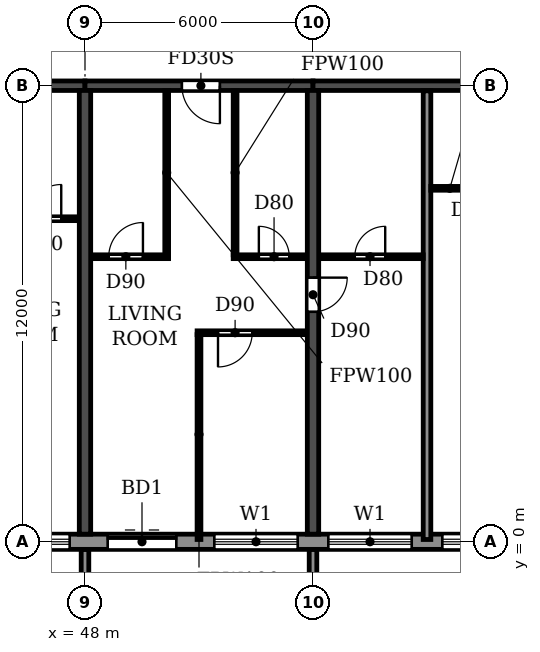
"""IFC4 building model, lengths in metres.
Left out: names, types, materials, properties, quantities, classifications, styles, units other than length and angle.
Written with IfcOpenShell. Run it as: python <this file> out.ifc"""

import sys

from ifc_helpers import new_model, si_unit, direction, frame, frame_2d, origin, place, context, subcontext, project, spatial, polyline, rectangle, outline, extrude, source, transform, mapped, element, fill, save


model = new_model("IFC4")
c1 = context("Model", 3, precision=1e-05, world=origin(), true_north=direction((0.0, 1.0)))
c2 = subcontext(c1, "Body", "Model", "MODEL_VIEW")
j1 = project(units=[si_unit("LENGTHUNIT", "METRE"), si_unit("PLANEANGLEUNIT", "RADIAN")], contexts=[c1])
p1 = place(None, origin())
s1 = spatial("IfcSite", under=j1, at=p1, CompositionType="ELEMENT")
p2 = place(p1, origin())
s2 = spatial("IfcBuilding", under=s1, at=p2, CompositionType="ELEMENT")
p3 = place(p2, frame((0.0, 0.0, 132.3)))
s3 = spatial("IfcBuildingStorey", under=s2, at=p3, CompositionType="ELEMENT", Elevation=132.3)
p4 = place(p3, frame((48.0, 0.2, 0.0), z_axis=(0.0, 0.0, 1.0), x_axis=(0.0, 1.0, 0.0)))
e1 = element("IfcWall", 1, at=p4, inside=s3, PredefinedType="SHEAR", context=c2, shape_type="SweptSolid", body=[
    extrude(rectangle(XDim=11.675, YDim=0.3, at=frame_2d((5.837, 0.0))), origin(), (0.0, 0.0, 1.0), 3.07),
])
p5 = place(p3, frame((54.0, 0.2, 0.0), z_axis=(0.0, 0.0, 1.0), x_axis=(0.0, 1.0, 0.0)))
e2 = element("IfcWall", 2, at=p5, inside=s3, PredefinedType="SHEAR", context=c2, shape_type="SweptSolid", body=[
    extrude(rectangle(XDim=11.675, YDim=0.3, at=frame_2d((5.837, 0.0))), origin(), (0.0, 0.0, 1.0), 3.07),
])
p6 = place(p5, frame((5.85, 0.0, 0.0)))
e3 = element("IfcOpeningElement", 3, at=p6, cuts=e2, PredefinedType="OPENING", context=c2, shape_type="SweptSolid", body=[
    extrude(rectangle(XDim=0.9, YDim=2.1, at=frame_2d((0.45, 1.05))), frame((0.0, 0.16, 0.0), z_axis=(0.0, -1.0, 0.0), x_axis=(1.0, 0.0, 0.0)), (0.0, 0.0, 1.0), 0.32),
])
p7 = place(p3, frame((42.0, 12.0, 0.0), z_axis=(0.0, 0.0, 1.0), x_axis=(1.0, 0.0, 0.0)))
e4 = element("IfcWall", 4, at=p7, inside=s3, PredefinedType="SHEAR", context=c2, shape_type="SweptSolid", body=[
    extrude(rectangle(XDim=6.0, YDim=0.25, at=frame_2d((3.0, 0.0))), origin(), (0.0, 0.0, 1.0), 2.47),
])
p8 = place(p7, frame((2.45, 0.0, 0.0)))
e5 = element("IfcOpeningElement", 5, at=p8, cuts=e4, PredefinedType="OPENING", context=c2, shape_type="SweptSolid", body=[
    extrude(rectangle(XDim=1.0, YDim=2.1, at=frame_2d((0.5, 1.05))), frame((0.0, 0.135, 0.0), z_axis=(0.0, -1.0, 0.0), x_axis=(1.0, 0.0, 0.0)), (0.0, 0.0, 1.0), 0.27),
])
p9 = place(p3, frame((48.0, 12.0, 0.0), z_axis=(0.0, 0.0, 1.0), x_axis=(1.0, 0.0, 0.0)))
e6 = element("IfcWall", 6, at=p9, inside=s3, PredefinedType="SHEAR", context=c2, shape_type="SweptSolid", body=[
    extrude(rectangle(XDim=6.0, YDim=0.25, at=frame_2d((3.0, 0.0))), origin(), (0.0, 0.0, 1.0), 2.47),
])
p10 = place(p9, frame((2.55, 0.0, 0.0)))
e7 = element("IfcOpeningElement", 7, at=p10, cuts=e6, PredefinedType="OPENING", context=c2, shape_type="SweptSolid", body=[
    extrude(rectangle(XDim=1.0, YDim=2.1, at=frame_2d((0.5, 1.05))), frame((0.0, 0.135, 0.0), z_axis=(0.0, -1.0, 0.0), x_axis=(1.0, 0.0, 0.0)), (0.0, 0.0, 1.0), 0.27),
])
p11 = place(p3, frame((54.0, 12.0, 0.0), z_axis=(0.0, 0.0, 1.0), x_axis=(1.0, 0.0, 0.0)))
e8 = element("IfcWall", 8, at=p11, inside=s3, PredefinedType="SHEAR", context=c2, shape_type="SweptSolid", body=[
    extrude(rectangle(XDim=6.0, YDim=0.25, at=frame_2d((3.0, 0.0))), origin(), (0.0, 0.0, 1.0), 2.47),
])
p12 = place(p3, frame((16.683, 0.0, 0.0), z_axis=(0.0, 0.0, 1.0), x_axis=(1.0, 0.0, 0.0)))
e9 = element("IfcWall", 9, at=p12, inside=s3, PredefinedType="STANDARD", context=c2, shape_type="SweptSolid", body=[
    extrude(rectangle(XDim=68.634, YDim=0.4, at=frame_2d((34.317, 0.0))), origin(), (0.0, 0.0, 1.0), 3.07),
])
p13 = place(p12, frame((1.717, 0.0, 0.9)))
e10 = element("IfcOpeningElement", 10, at=p13, cuts=e9, PredefinedType="OPENING", context=c2, shape_type="SweptSolid", body=[
    extrude(rectangle(XDim=2.2, YDim=1.5, at=frame_2d((1.1, 0.75))), frame((0.0, 0.21, 0.0), z_axis=(0.0, -1.0, 0.0), x_axis=(1.0, 0.0, 0.0)), (0.0, 0.0, 1.0), 0.42),
])
p14 = place(p12, frame((4.717, 0.0, 0.9)))
e11 = element("IfcOpeningElement", 11, at=p14, cuts=e9, PredefinedType="OPENING", context=c2, shape_type="SweptSolid", body=[
    extrude(rectangle(XDim=2.2, YDim=1.5, at=frame_2d((1.1, 0.75))), frame((0.0, 0.21, 0.0), z_axis=(0.0, -1.0, 0.0), x_axis=(1.0, 0.0, 0.0)), (0.0, 0.0, 1.0), 0.42),
])
p15 = place(p12, frame((7.717, 0.0, 0.9)))
e12 = element("IfcOpeningElement", 12, at=p15, cuts=e9, PredefinedType="OPENING", context=c2, shape_type="SweptSolid", body=[
    extrude(rectangle(XDim=2.2, YDim=1.5, at=frame_2d((1.1, 0.75))), frame((0.0, 0.21, 0.0), z_axis=(0.0, -1.0, 0.0), x_axis=(1.0, 0.0, 0.0)), (0.0, 0.0, 1.0), 0.42),
])
p16 = place(p12, frame((10.917, 0.0, 0.0)))
e13 = element("IfcOpeningElement", 13, at=p16, cuts=e9, PredefinedType="OPENING", context=c2, shape_type="SweptSolid", body=[
    extrude(rectangle(XDim=1.8, YDim=2.4, at=frame_2d((0.9, 1.2))), frame((0.0, 0.21, 0.0), z_axis=(0.0, -1.0, 0.0), x_axis=(1.0, 0.0, 0.0)), (0.0, 0.0, 1.0), 0.42),
])
p17 = place(p12, frame((13.717, 0.0, 0.9)))
e14 = element("IfcOpeningElement", 14, at=p17, cuts=e9, PredefinedType="OPENING", context=c2, shape_type="SweptSolid", body=[
    extrude(rectangle(XDim=2.2, YDim=1.5, at=frame_2d((1.1, 0.75))), frame((0.0, 0.21, 0.0), z_axis=(0.0, -1.0, 0.0), x_axis=(1.0, 0.0, 0.0)), (0.0, 0.0, 1.0), 0.42),
])
p18 = place(p12, frame((16.717, 0.0, 0.9)))
e15 = element("IfcOpeningElement", 15, at=p18, cuts=e9, PredefinedType="OPENING", context=c2, shape_type="SweptSolid", body=[
    extrude(rectangle(XDim=2.2, YDim=1.5, at=frame_2d((1.1, 0.75))), frame((0.0, 0.21, 0.0), z_axis=(0.0, -1.0, 0.0), x_axis=(1.0, 0.0, 0.0)), (0.0, 0.0, 1.0), 0.42),
])
p19 = place(p12, frame((19.917, 0.0, 0.0)))
e16 = element("IfcOpeningElement", 16, at=p19, cuts=e9, PredefinedType="OPENING", context=c2, shape_type="SweptSolid", body=[
    extrude(rectangle(XDim=1.8, YDim=2.4, at=frame_2d((0.9, 1.2))), frame((0.0, 0.21, 0.0), z_axis=(0.0, -1.0, 0.0), x_axis=(1.0, 0.0, 0.0)), (0.0, 0.0, 1.0), 0.42),
])
p20 = place(p12, frame((22.717, 0.0, 0.9)))
e17 = element("IfcOpeningElement", 17, at=p20, cuts=e9, PredefinedType="OPENING", context=c2, shape_type="SweptSolid", body=[
    extrude(rectangle(XDim=2.2, YDim=1.5, at=frame_2d((1.1, 0.75))), frame((0.0, 0.21, 0.0), z_axis=(0.0, -1.0, 0.0), x_axis=(1.0, 0.0, 0.0)), (0.0, 0.0, 1.0), 0.42),
])
p21 = place(p12, frame((25.717, 0.0, 0.9)))
e18 = element("IfcOpeningElement", 18, at=p21, cuts=e9, PredefinedType="OPENING", context=c2, shape_type="SweptSolid", body=[
    extrude(rectangle(XDim=2.2, YDim=1.5, at=frame_2d((1.1, 0.75))), frame((0.0, 0.21, 0.0), z_axis=(0.0, -1.0, 0.0), x_axis=(1.0, 0.0, 0.0)), (0.0, 0.0, 1.0), 0.42),
])
p22 = place(p12, frame((28.717, 0.0, 0.9)))
e19 = element("IfcOpeningElement", 19, at=p22, cuts=e9, PredefinedType="OPENING", context=c2, shape_type="SweptSolid", body=[
    extrude(rectangle(XDim=2.2, YDim=1.5, at=frame_2d((1.1, 0.75))), frame((0.0, 0.21, 0.0), z_axis=(0.0, -1.0, 0.0), x_axis=(1.0, 0.0, 0.0)), (0.0, 0.0, 1.0), 0.42),
])
p23 = place(p12, frame((31.917, 0.0, 0.0)))
e20 = element("IfcOpeningElement", 20, at=p23, cuts=e9, PredefinedType="OPENING", context=c2, shape_type="SweptSolid", body=[
    extrude(rectangle(XDim=1.8, YDim=2.4, at=frame_2d((0.9, 1.2))), frame((0.0, 0.21, 0.0), z_axis=(0.0, -1.0, 0.0), x_axis=(1.0, 0.0, 0.0)), (0.0, 0.0, 1.0), 0.42),
])
p24 = place(p12, frame((34.717, 0.0, 0.9)))
e21 = element("IfcOpeningElement", 21, at=p24, cuts=e9, PredefinedType="OPENING", context=c2, shape_type="SweptSolid", body=[
    extrude(rectangle(XDim=2.2, YDim=1.5, at=frame_2d((1.1, 0.75))), frame((0.0, 0.21, 0.0), z_axis=(0.0, -1.0, 0.0), x_axis=(1.0, 0.0, 0.0)), (0.0, 0.0, 1.0), 0.42),
])
p25 = place(p12, frame((37.717, 0.0, 0.9)))
e22 = element("IfcOpeningElement", 22, at=p25, cuts=e9, PredefinedType="OPENING", context=c2, shape_type="SweptSolid", body=[
    extrude(rectangle(XDim=2.2, YDim=1.5, at=frame_2d((1.1, 0.75))), frame((0.0, 0.21, 0.0), z_axis=(0.0, -1.0, 0.0), x_axis=(1.0, 0.0, 0.0)), (0.0, 0.0, 1.0), 0.42),
])
p26 = place(p12, frame((40.717, 0.0, 0.9)))
e23 = element("IfcOpeningElement", 23, at=p26, cuts=e9, PredefinedType="OPENING", context=c2, shape_type="SweptSolid", body=[
    extrude(rectangle(XDim=2.2, YDim=1.5, at=frame_2d((1.1, 0.75))), frame((0.0, 0.21, 0.0), z_axis=(0.0, -1.0, 0.0), x_axis=(1.0, 0.0, 0.0)), (0.0, 0.0, 1.0), 0.42),
])
p27 = place(p12, frame((43.717, 0.0, 0.9)))
e24 = element("IfcOpeningElement", 24, at=p27, cuts=e9, PredefinedType="OPENING", context=c2, shape_type="SweptSolid", body=[
    extrude(rectangle(XDim=2.2, YDim=1.5, at=frame_2d((1.1, 0.75))), frame((0.0, 0.21, 0.0), z_axis=(0.0, -1.0, 0.0), x_axis=(1.0, 0.0, 0.0)), (0.0, 0.0, 1.0), 0.42),
])
p28 = place(p12, frame((46.917, 0.0, 0.0)))
e25 = element("IfcOpeningElement", 25, at=p28, cuts=e9, PredefinedType="OPENING", context=c2, shape_type="SweptSolid", body=[
    extrude(rectangle(XDim=1.8, YDim=2.4, at=frame_2d((0.9, 1.2))), frame((0.0, 0.21, 0.0), z_axis=(0.0, -1.0, 0.0), x_axis=(1.0, 0.0, 0.0)), (0.0, 0.0, 1.0), 0.42),
])
p29 = place(p12, frame((49.717, 0.0, 0.9)))
e26 = element("IfcOpeningElement", 26, at=p29, cuts=e9, PredefinedType="OPENING", context=c2, shape_type="SweptSolid", body=[
    extrude(rectangle(XDim=2.2, YDim=1.5, at=frame_2d((1.1, 0.75))), frame((0.0, 0.21, 0.0), z_axis=(0.0, -1.0, 0.0), x_axis=(1.0, 0.0, 0.0)), (0.0, 0.0, 1.0), 0.42),
])
p30 = place(p12, frame((52.717, 0.0, 0.9)))
e27 = element("IfcOpeningElement", 27, at=p30, cuts=e9, PredefinedType="OPENING", context=c2, shape_type="SweptSolid", body=[
    extrude(rectangle(XDim=2.2, YDim=1.5, at=frame_2d((1.1, 0.75))), frame((0.0, 0.21, 0.0), z_axis=(0.0, -1.0, 0.0), x_axis=(1.0, 0.0, 0.0)), (0.0, 0.0, 1.0), 0.42),
])
p31 = place(p12, frame((55.717, 0.0, 0.9)))
e28 = element("IfcOpeningElement", 28, at=p31, cuts=e9, PredefinedType="OPENING", context=c2, shape_type="SweptSolid", body=[
    extrude(rectangle(XDim=2.2, YDim=1.5, at=frame_2d((1.1, 0.75))), frame((0.0, 0.21, 0.0), z_axis=(0.0, -1.0, 0.0), x_axis=(1.0, 0.0, 0.0)), (0.0, 0.0, 1.0), 0.42),
])
p32 = place(p12, frame((58.917, 0.0, 0.0)))
e29 = element("IfcOpeningElement", 29, at=p32, cuts=e9, PredefinedType="OPENING", context=c2, shape_type="SweptSolid", body=[
    extrude(rectangle(XDim=1.8, YDim=2.4, at=frame_2d((0.9, 1.2))), frame((0.0, 0.21, 0.0), z_axis=(0.0, -1.0, 0.0), x_axis=(1.0, 0.0, 0.0)), (0.0, 0.0, 1.0), 0.42),
])
p33 = place(p12, frame((61.717, 0.0, 0.9)))
e30 = element("IfcOpeningElement", 30, at=p33, cuts=e9, PredefinedType="OPENING", context=c2, shape_type="SweptSolid", body=[
    extrude(rectangle(XDim=2.2, YDim=1.5, at=frame_2d((1.1, 0.75))), frame((0.0, 0.21, 0.0), z_axis=(0.0, -1.0, 0.0), x_axis=(1.0, 0.0, 0.0)), (0.0, 0.0, 1.0), 0.42),
])
p34 = place(p12, frame((64.717, 0.0, 0.9)))
e31 = element("IfcOpeningElement", 31, at=p34, cuts=e9, PredefinedType="OPENING", context=c2, shape_type="SweptSolid", body=[
    extrude(rectangle(XDim=2.2, YDim=1.5, at=frame_2d((1.1, 0.75))), frame((0.0, 0.21, 0.0), z_axis=(0.0, -1.0, 0.0), x_axis=(1.0, 0.0, 0.0)), (0.0, 0.0, 1.0), 0.42),
])
m1 = source(origin(), c2, "Body", "SweptSolid", [
    extrude(outline(polyline([(0.0, 0.0), (0.2, 0.0), (0.2, 1.65), (0.0, 1.65), (0.0, 0.0)])), origin(), (0.0, 0.0, 1.0), 3.1),
])
for number, where in (
    (32, (47.9, -1.85, 0.0)),
    (33, (53.9, -1.85, 0.0)),
):
    element("IfcWall", number, at=place(p3, frame(where)), inside=s3, PredefinedType="STANDARD", context=c2, shape_type="MappedRepresentation", body=[
        mapped(m1, transform((0.0, 0.0, 0.0))),
    ])
p35 = place(p3, frame((57.0, 0.06, 0.0), z_axis=(0.0, 0.0, 1.0), x_axis=(0.0, 1.0, 0.0)))
e34 = element("IfcWall", 34, at=p35, inside=s3, PredefinedType="PARTITIONING", context=c2, shape_type="SweptSolid", body=[
    extrude(rectangle(XDim=11.805, YDim=0.2, at=frame_2d((5.902, 0.0))), origin(), (0.0, 0.0, 1.0), 3.07),
])
p36 = place(p3, frame((50.95, 5.5, 0.0), z_axis=(0.0, 0.0, 1.0), x_axis=(1.0, 0.0, 0.0)))
e35 = element("IfcWall", 35, at=p36, inside=s3, PredefinedType="PARTITIONING", context=c2, shape_type="SweptSolid", body=[
    extrude(rectangle(XDim=2.89, YDim=0.1, at=frame_2d((1.445, 0.0))), origin(), (0.0, 0.0, 1.0), 3.07),
])
p37 = place(p36, frame((0.55, 0.0, 0.0)))
e36 = element("IfcOpeningElement", 36, at=p37, cuts=e35, PredefinedType="OPENING", context=c2, shape_type="SweptSolid", body=[
    extrude(rectangle(XDim=0.9, YDim=2.1, at=frame_2d((0.45, 1.05))), frame((0.0, 0.06, 0.0), z_axis=(0.0, -1.0, 0.0), x_axis=(1.0, 0.0, 0.0)), (0.0, 0.0, 1.0), 0.12),
])
p38 = place(p3, frame((48.16, 7.5, 0.0), z_axis=(0.0, 0.0, 1.0), x_axis=(1.0, 0.0, 0.0)))
e37 = element("IfcWall", 37, at=p38, inside=s3, PredefinedType="PARTITIONING", context=c2, shape_type="SweptSolid", body=[
    extrude(rectangle(XDim=2.04, YDim=0.1, at=frame_2d((1.02, 0.0))), origin(), (0.0, 0.0, 1.0), 3.07),
])
p39 = place(p38, frame((0.465, 0.0, 0.0)))
e38 = element("IfcOpeningElement", 38, at=p39, cuts=e37, PredefinedType="OPENING", context=c2, shape_type="SweptSolid", body=[
    extrude(rectangle(XDim=0.9, YDim=2.1, at=frame_2d((0.45, 1.05))), frame((0.0, 0.06, 0.0), z_axis=(0.0, -1.0, 0.0), x_axis=(1.0, 0.0, 0.0)), (0.0, 0.0, 1.0), 0.12),
])
p40 = place(p3, frame((51.9, 7.5, 0.0), z_axis=(0.0, 0.0, 1.0), x_axis=(1.0, 0.0, 0.0)))
e39 = element("IfcWall", 39, at=p40, inside=s3, PredefinedType="PARTITIONING", context=c2, shape_type="SweptSolid", body=[
    extrude(rectangle(XDim=1.94, YDim=0.1, at=frame_2d((0.97, 0.0))), origin(), (0.0, 0.0, 1.0), 3.07),
])
p41 = place(p40, frame((0.675, 0.0, 0.0)))
e40 = element("IfcOpeningElement", 40, at=p41, cuts=e39, PredefinedType="OPENING", context=c2, shape_type="SweptSolid", body=[
    extrude(rectangle(XDim=0.8, YDim=2.1, at=frame_2d((0.4, 1.05))), frame((0.0, 0.06, 0.0), z_axis=(0.0, -1.0, 0.0), x_axis=(1.0, 0.0, 0.0)), (0.0, 0.0, 1.0), 0.12),
])
p42 = place(p3, frame((54.16, 7.5, 0.0), z_axis=(0.0, 0.0, 1.0), x_axis=(1.0, 0.0, 0.0)))
e41 = element("IfcWall", 41, at=p42, inside=s3, PredefinedType="PARTITIONING", context=c2, shape_type="SweptSolid", body=[
    extrude(rectangle(XDim=2.74, YDim=0.1, at=frame_2d((1.37, 0.0))), origin(), (0.0, 0.0, 1.0), 3.07),
])
p43 = place(p42, frame((0.94, 0.0, 0.0)))
e42 = element("IfcOpeningElement", 42, at=p43, cuts=e41, PredefinedType="OPENING", context=c2, shape_type="SweptSolid", body=[
    extrude(rectangle(XDim=0.8, YDim=2.1, at=frame_2d((0.4, 1.05))), frame((0.0, 0.06, 0.0), z_axis=(0.0, -1.0, 0.0), x_axis=(1.0, 0.0, 0.0)), (0.0, 0.0, 1.0), 0.12),
])
p44 = place(p3, frame((45.8, 8.5, 0.0), z_axis=(0.0, 0.0, 1.0), x_axis=(1.0, 0.0, 0.0)))
e43 = element("IfcWall", 43, at=p44, inside=s3, PredefinedType="PARTITIONING", context=c2, shape_type="SweptSolid", body=[
    extrude(rectangle(XDim=2.04, YDim=0.1, at=frame_2d((1.02, 0.0))), origin(), (0.0, 0.0, 1.0), 3.07),
])
p45 = place(p44, frame((0.675, 0.0, 0.0)))
e44 = element("IfcOpeningElement", 44, at=p45, cuts=e43, PredefinedType="OPENING", context=c2, shape_type="SweptSolid", body=[
    extrude(rectangle(XDim=0.9, YDim=2.1, at=frame_2d((0.45, 1.05))), frame((0.0, 0.06, 0.0), z_axis=(0.0, -1.0, 0.0), x_axis=(1.0, 0.0, 0.0)), (0.0, 0.0, 1.0), 0.12),
])
p46 = place(p3, frame((57.1, 9.3, 0.0), z_axis=(0.0, 0.0, 1.0), x_axis=(1.0, 0.0, 0.0)))
e45 = element("IfcWall", 45, at=p46, inside=s3, PredefinedType="PARTITIONING", context=c2, shape_type="SweptSolid", body=[
    extrude(rectangle(XDim=2.74, YDim=0.1, at=frame_2d((1.37, 0.0))), origin(), (0.0, 0.0, 1.0), 3.07),
])
p47 = place(p46, frame((1.0, 0.0, 0.0)))
e46 = element("IfcOpeningElement", 46, at=p47, cuts=e45, PredefinedType="OPENING", context=c2, shape_type="SweptSolid", body=[
    extrude(rectangle(XDim=0.8, YDim=2.1, at=frame_2d((0.4, 1.05))), frame((0.0, 0.06, 0.0), z_axis=(0.0, -1.0, 0.0), x_axis=(1.0, 0.0, 0.0)), (0.0, 0.0, 1.0), 0.12),
])
p48 = place(p3, frame((50.15, 7.55, 0.0), z_axis=(0.0, 0.0, 1.0), x_axis=(0.0, 1.0, 0.0)))
e47 = element("IfcWall", 47, at=p48, inside=s3, PredefinedType="PARTITIONING", context=c2, shape_type="SweptSolid", body=[
    extrude(rectangle(XDim=4.315, YDim=0.1, at=frame_2d((2.157, 0.0))), origin(), (0.0, 0.0, 1.0), 3.07),
])
p49 = place(p3, frame((51.0, 0.06, 0.0), z_axis=(0.0, 0.0, 1.0), x_axis=(0.0, 1.0, 0.0)))
e48 = element("IfcWall", 48, at=p49, inside=s3, PredefinedType="PARTITIONING", context=c2, shape_type="SweptSolid", body=[
    extrude(rectangle(XDim=5.39, YDim=0.1, at=frame_2d((2.695, 0.0))), origin(), (0.0, 0.0, 1.0), 3.07),
])
p50 = place(p3, frame((51.95, 7.55, 0.0), z_axis=(0.0, 0.0, 1.0), x_axis=(0.0, 1.0, 0.0)))
e49 = element("IfcWall", 49, at=p50, inside=s3, PredefinedType="PARTITIONING", context=c2, shape_type="SweptSolid", body=[
    extrude(rectangle(XDim=4.315, YDim=0.1, at=frame_2d((2.157, 0.0))), origin(), (0.0, 0.0, 1.0), 3.07),
])
p51 = place(p22, origin())
e50 = element("IfcWindow", 50, at=p51, inside=s3, PartitioningType="DOUBLE_PANEL_HORIZONTAL", PredefinedType="WINDOW", context=c2, shape_type="SweptSolid", body=[
    extrude(rectangle(XDim=2.2, YDim=1.5, at=frame_2d((1.1, 0.75))), frame((0.0, 0.03, 0.0), z_axis=(0.0, -1.0, 0.0), x_axis=(1.0, 0.0, 0.0)), (0.0, 0.0, 1.0), 0.06),
])
fill(e19, e50)
p52 = place(p23, origin())
e51 = element("IfcDoor", 51, at=p52, inside=s3, OperationType="DOUBLE_DOOR_SLIDING", PredefinedType="DOOR", context=c2, shape_type="SweptSolid", body=[
    extrude(rectangle(XDim=1.8, YDim=2.4, at=frame_2d((0.9, 1.2))), frame((0.0, 0.025, 0.0), z_axis=(0.0, -1.0, 0.0), x_axis=(1.0, 0.0, 0.0)), (0.0, 0.0, 1.0), 0.05),
])
fill(e20, e51)
p53 = place(p24, origin())
e52 = element("IfcWindow", 52, at=p53, inside=s3, PartitioningType="DOUBLE_PANEL_HORIZONTAL", PredefinedType="WINDOW", context=c2, shape_type="SweptSolid", body=[
    extrude(rectangle(XDim=2.2, YDim=1.5, at=frame_2d((1.1, 0.75))), frame((0.0, 0.03, 0.0), z_axis=(0.0, -1.0, 0.0), x_axis=(1.0, 0.0, 0.0)), (0.0, 0.0, 1.0), 0.06),
])
fill(e21, e52)
p54 = place(p25, origin())
e53 = element("IfcWindow", 53, at=p54, inside=s3, PartitioningType="DOUBLE_PANEL_HORIZONTAL", PredefinedType="WINDOW", context=c2, shape_type="SweptSolid", body=[
    extrude(rectangle(XDim=2.2, YDim=1.5, at=frame_2d((1.1, 0.75))), frame((0.0, 0.03, 0.0), z_axis=(0.0, -1.0, 0.0), x_axis=(1.0, 0.0, 0.0)), (0.0, 0.0, 1.0), 0.06),
])
fill(e22, e53)
p55 = place(p26, origin())
e54 = element("IfcWindow", 54, at=p55, inside=s3, PartitioningType="DOUBLE_PANEL_HORIZONTAL", PredefinedType="WINDOW", context=c2, shape_type="SweptSolid", body=[
    extrude(rectangle(XDim=2.2, YDim=1.5, at=frame_2d((1.1, 0.75))), frame((0.0, 0.03, 0.0), z_axis=(0.0, -1.0, 0.0), x_axis=(1.0, 0.0, 0.0)), (0.0, 0.0, 1.0), 0.06),
])
fill(e23, e54)
p56 = place(p45, origin())
e55 = element("IfcDoor", 55, at=p56, inside=s3, OperationType="SINGLE_SWING_RIGHT", PredefinedType="DOOR", context=c2, shape_type="SweptSolid", body=[
    extrude(rectangle(XDim=0.9, YDim=2.1, at=frame_2d((0.45, 1.05))), frame((0.0, 0.025, 0.0), z_axis=(0.0, -1.0, 0.0), x_axis=(1.0, 0.0, 0.0)), (0.0, 0.0, 1.0), 0.05),
])
fill(e44, e55)
p57 = place(p43, origin())
e56 = element("IfcDoor", 56, at=p57, inside=s3, OperationType="SINGLE_SWING_RIGHT", PredefinedType="DOOR", context=c2, shape_type="SweptSolid", body=[
    extrude(rectangle(XDim=0.8, YDim=2.1, at=frame_2d((0.4, 1.05))), frame((0.0, 0.025, 0.0), z_axis=(0.0, -1.0, 0.0), x_axis=(1.0, 0.0, 0.0)), (0.0, 0.0, 1.0), 0.05),
])
fill(e42, e56)
p58 = place(p39, origin())
e57 = element("IfcDoor", 57, at=p58, inside=s3, OperationType="SINGLE_SWING_RIGHT", PredefinedType="DOOR", context=c2, shape_type="SweptSolid", body=[
    extrude(rectangle(XDim=0.9, YDim=2.1, at=frame_2d((0.45, 1.05))), frame((0.0, 0.025, 0.0), z_axis=(0.0, -1.0, 0.0), x_axis=(1.0, 0.0, 0.0)), (0.0, 0.0, 1.0), 0.05),
])
fill(e38, e57)
p59 = place(p10, frame((1.0, 0.0, 0.0), z_axis=(0.0, 0.0, 1.0), x_axis=(-1.0, 0.0, 0.0)))
e58 = element("IfcDoor", 58, at=p59, inside=s3, OperationType="SINGLE_SWING_LEFT", PredefinedType="DOOR", context=c2, shape_type="SweptSolid", body=[
    extrude(rectangle(XDim=1.0, YDim=2.1, at=frame_2d((0.5, 1.05))), frame((0.0, 0.025, 0.0), z_axis=(0.0, -1.0, 0.0), x_axis=(1.0, 0.0, 0.0)), (0.0, 0.0, 1.0), 0.05),
])
fill(e7, e58)
p60 = place(p37, frame((0.9, 0.0, 0.0), z_axis=(0.0, 0.0, 1.0), x_axis=(-1.0, 0.0, 0.0)))
e59 = element("IfcDoor", 59, at=p60, inside=s3, OperationType="SINGLE_SWING_RIGHT", PredefinedType="DOOR", context=c2, shape_type="SweptSolid", body=[
    extrude(rectangle(XDim=0.9, YDim=2.1, at=frame_2d((0.45, 1.05))), frame((0.0, 0.025, 0.0), z_axis=(0.0, -1.0, 0.0), x_axis=(1.0, 0.0, 0.0)), (0.0, 0.0, 1.0), 0.05),
])
fill(e36, e59)
p61 = place(p41, origin())
e60 = element("IfcDoor", 60, at=p61, inside=s3, OperationType="SINGLE_SWING_LEFT", PredefinedType="DOOR", context=c2, shape_type="SweptSolid", body=[
    extrude(rectangle(XDim=0.8, YDim=2.1, at=frame_2d((0.4, 1.05))), frame((0.0, 0.025, 0.0), z_axis=(0.0, -1.0, 0.0), x_axis=(1.0, 0.0, 0.0)), (0.0, 0.0, 1.0), 0.05),
])
fill(e40, e60)
p62 = place(p6, frame((0.9, 0.0, 0.0), z_axis=(0.0, 0.0, 1.0), x_axis=(-1.0, 0.0, 0.0)))
e61 = element("IfcDoor", 61, at=p62, inside=s3, OperationType="SINGLE_SWING_LEFT", PredefinedType="DOOR", context=c2, shape_type="SweptSolid", body=[
    extrude(rectangle(XDim=0.9, YDim=2.1, at=frame_2d((0.45, 1.05))), frame((0.0, 0.025, 0.0), z_axis=(0.0, -1.0, 0.0), x_axis=(1.0, 0.0, 0.0)), (0.0, 0.0, 1.0), 0.05),
])
fill(e3, e61)
save(model, sys.argv[1])
